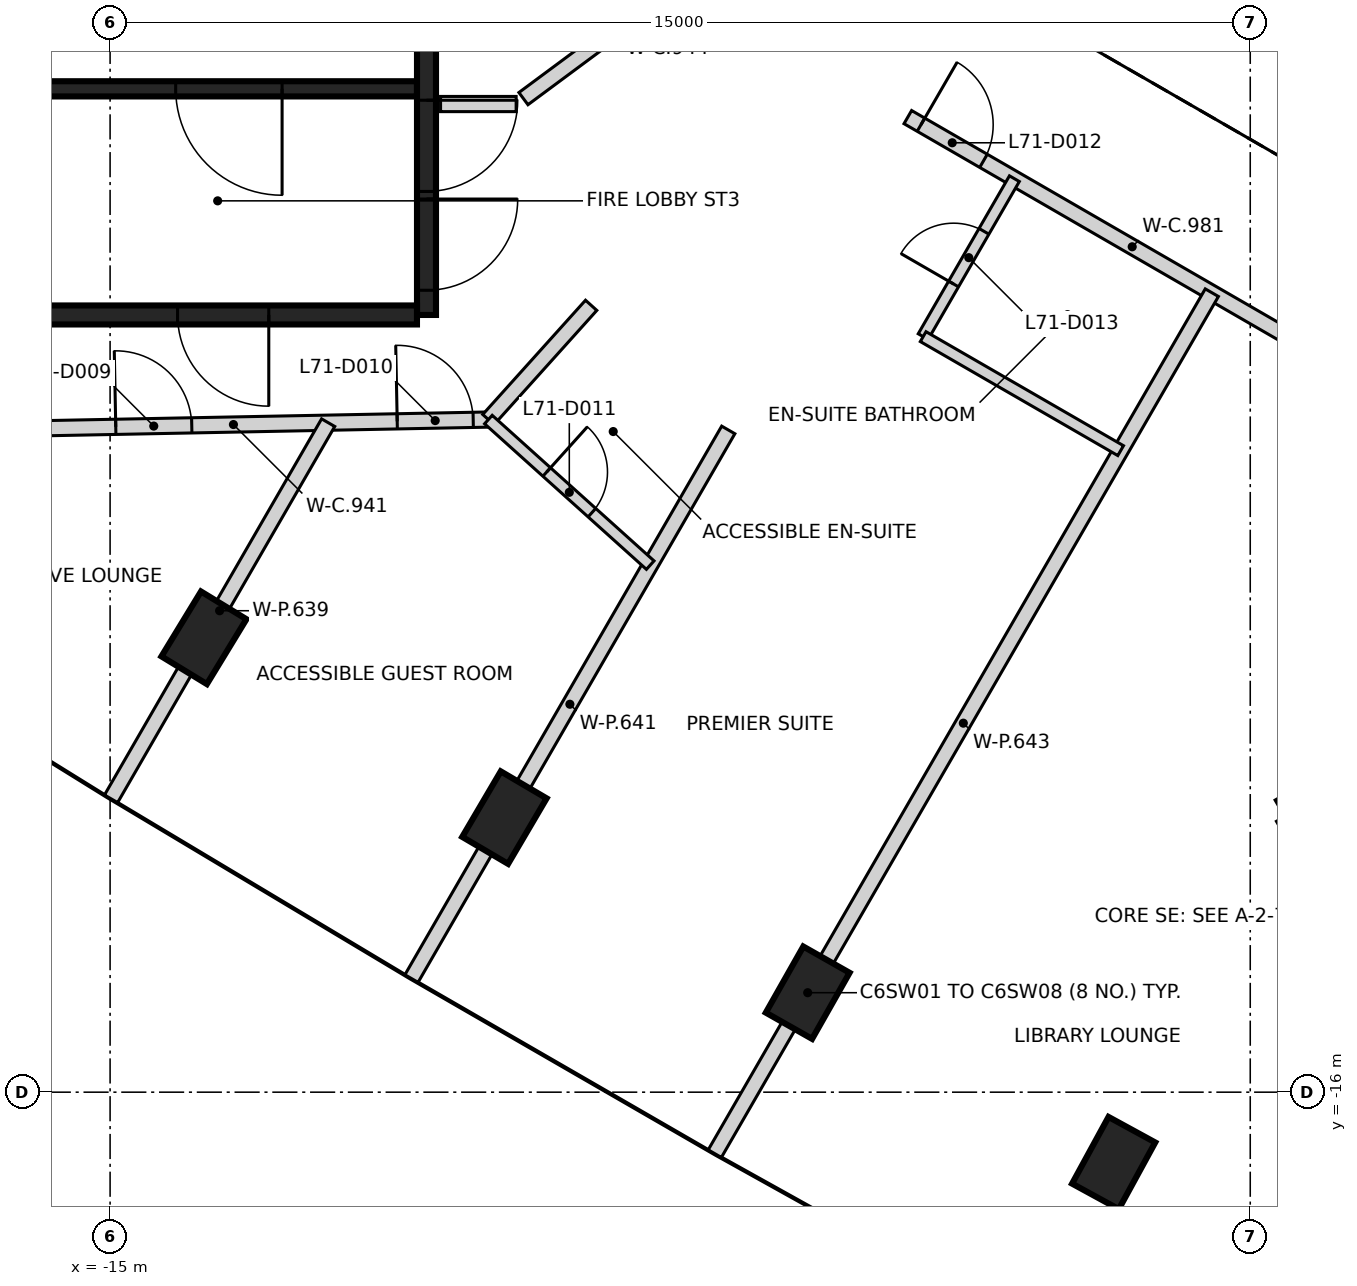
"""IFC4 building model, lengths in metres.
Left out: names, types, materials, properties, quantities, classifications, styles, units other than length and angle.
Written with IfcOpenShell. Run it as: python <this file> out.ifc"""

import sys

from ifc_helpers import new_model, si_unit, direction, frame, frame_2d, origin, origin_2d, place, context, subcontext, project, spatial, rectangle, extrude, element, fill, save


model = new_model("IFC4")
c1 = context("Model", 3, precision=1e-05, world=origin(), true_north=direction((0.0, 1.0)))
c2 = subcontext(c1, "Body", "Model", "MODEL_VIEW")
j1 = project(units=[si_unit("LENGTHUNIT", "METRE"), si_unit("PLANEANGLEUNIT", "RADIAN")], contexts=[c1])
p1 = place(None, origin())
s1 = spatial("IfcSite", under=j1, at=p1, CompositionType="ELEMENT")
p2 = place(p1, origin())
s2 = spatial("IfcBuilding", under=s1, at=p2, CompositionType="ELEMENT")
p3 = place(p2, frame((0.0, 0.0, 280.2)))
s3 = spatial("IfcBuildingStorey", under=s2, at=p3, CompositionType="ELEMENT", Elevation=280.2)
for number, where, z_axis, x_axis in (
    (1, (-13.765, -10.022, -0.35), (0.0, 0.0, 1.0), (0.52, 0.854, 0.0)),
    (2, (-9.812, -12.388, -0.35), (0.0, 0.0, 1.0), (0.507, 0.862, 0.0)),
    (3, (-5.822, -14.691, -0.35), (0.0, 0.0, 1.0), (0.493, 0.87, 0.0)),
    (4, (-1.797, -16.932, -0.35), (0.0, 0.0, 1.0), (0.479, 0.878, 0.0)),
):
    element("IfcColumn", number, at=place(p3, frame(where, z_axis=z_axis, x_axis=x_axis)), inside=s3, PredefinedType="COLUMN", context=c2, shape_type="SweptSolid", body=[
        extrude(rectangle(XDim=1.0, YDim=0.7, at=origin_2d()), origin(), (0.0, 0.0, 1.0), 3.6),
    ])
p4 = place(p3, frame((-10.837, 5.775, 0.0), z_axis=(0.0, 0.0, 1.0), x_axis=(0.0, -1.0, 0.0)))
e5 = element("IfcWall", 5, at=p4, inside=s3, PredefinedType="SHEAR", context=c2, shape_type="SweptSolid", body=[
    extrude(rectangle(XDim=11.55, YDim=0.25, at=frame_2d((5.775, 0.0))), origin(), (0.0, 0.0, 1.0), 3.25),
])
p5 = place(p4, frame((10.025, 0.0, 0.0)))
e6 = element("IfcOpeningElement", 6, at=p5, cuts=e5, PredefinedType="OPENING", context=c2, shape_type="SweptSolid", body=[
    extrude(rectangle(XDim=1.2, YDim=2.1, at=frame_2d((0.6, 1.05))), frame((0.0, 0.135, 0.0), z_axis=(0.0, -1.0, 0.0), x_axis=(1.0, 0.0, 0.0)), (0.0, 0.0, 1.0), 0.27),
])
p6 = place(p4, frame((8.725, 0.0, 0.0)))
e7 = element("IfcOpeningElement", 7, at=p6, cuts=e5, PredefinedType="OPENING", context=c2, shape_type="SweptSolid", body=[
    extrude(rectangle(XDim=1.2, YDim=2.1, at=frame_2d((0.6, 1.05))), frame((0.0, 0.135, 0.0), z_axis=(0.0, -1.0, 0.0), x_axis=(1.0, 0.0, 0.0)), (0.0, 0.0, 1.0), 0.27),
])
p7 = place(p3, frame((-10.963, -5.775, 0.0), z_axis=(0.0, 0.0, 1.0), x_axis=(-1.0, 0.0, 0.0)))
e8 = element("IfcWall", 8, at=p7, inside=s3, PredefinedType="SHEAR", context=c2, shape_type="SweptSolid", body=[
    extrude(rectangle(XDim=5.225, YDim=0.25, at=frame_2d((2.612, 0.0))), origin(), (0.0, 0.0, 1.0), 3.25),
])
p8 = place(p7, frame((1.95, 0.0, 0.0)))
e9 = element("IfcOpeningElement", 9, at=p8, cuts=e8, PredefinedType="OPENING", context=c2, shape_type="SweptSolid", body=[
    extrude(rectangle(XDim=1.2, YDim=2.1, at=frame_2d((0.6, 1.05))), frame((0.0, 0.135, 0.0), z_axis=(0.0, -1.0, 0.0), x_axis=(1.0, 0.0, 0.0)), (0.0, 0.0, 1.0), 0.27),
])
p9 = place(p3, frame((-10.963, -2.8, 0.0), z_axis=(0.0, 0.0, 1.0), x_axis=(-1.0, 0.0, 0.0)))
e10 = element("IfcWall", 10, at=p9, inside=s3, PredefinedType="SHEAR", context=c2, shape_type="SweptSolid", body=[
    extrude(rectangle(XDim=5.098, YDim=0.2, at=frame_2d((2.549, 0.0))), origin(), (0.0, 0.0, 1.0), 3.25),
])
p10 = place(p9, frame((1.774, 0.0, 0.0)))
e11 = element("IfcOpeningElement", 11, at=p10, cuts=e10, PredefinedType="OPENING", context=c2, shape_type="SweptSolid", body=[
    extrude(rectangle(XDim=1.4, YDim=2.1, at=frame_2d((0.7, 1.05))), frame((0.0, 0.11, 0.0), z_axis=(0.0, -1.0, 0.0), x_axis=(1.0, 0.0, 0.0)), (0.0, 0.0, 1.0), 0.22),
])
p11 = place(p3, frame((0.417, -12.273, 0.0), z_axis=(0.0, 0.0, 1.0), x_axis=(0.866021906294, 0.500006057782, 0.0)))
e12 = element("IfcWall", 12, at=p11, inside=s3, PredefinedType="SHEAR", context=c2, shape_type="SweptSolid", body=[
    extrude(rectangle(XDim=11.55, YDim=0.25, at=frame_2d((5.775, 0.0))), origin(), (0.0, 0.0, 1.0), 3.25),
])
p12 = place(p11, frame((10.025, 0.0, 0.0)))
e13 = element("IfcOpeningElement", 13, at=p12, cuts=e12, PredefinedType="OPENING", context=c2, shape_type="SweptSolid", body=[
    extrude(rectangle(XDim=1.2, YDim=2.1, at=frame_2d((0.6, 1.05))), frame((0.0, 0.135, 0.0), z_axis=(0.0, -1.0, 0.0), x_axis=(1.0, 0.0, 0.0)), (0.0, 0.0, 1.0), 0.27),
])
p13 = place(p11, frame((8.725, 0.0, 0.0)))
e14 = element("IfcOpeningElement", 14, at=p13, cuts=e12, PredefinedType="OPENING", context=c2, shape_type="SweptSolid", body=[
    extrude(rectangle(XDim=1.2, YDim=2.1, at=frame_2d((0.6, 1.05))), frame((0.0, 0.135, 0.0), z_axis=(0.0, -1.0, 0.0), x_axis=(1.0, 0.0, 0.0)), (0.0, 0.0, 1.0), 0.27),
])
p14 = place(p3, frame((-16.732, -7.282, 0.0), z_axis=(0.0, 0.0, 1.0), x_axis=(0.999809829903, 0.019501385329, 0.0)))
e15 = element("IfcWall", 15, at=p14, inside=s3, PredefinedType="PARTITIONING", context=c2, shape_type="SweptSolid", body=[
    extrude(rectangle(XDim=6.71, YDim=0.2, at=frame_2d((3.355, 0.0))), origin(), (0.0, 0.0, 1.0), 3.25),
])
p15 = place(p14, frame((1.807, 0.0, 0.0)))
e16 = element("IfcOpeningElement", 16, at=p15, cuts=e15, PredefinedType="OPENING", context=c2, shape_type="SweptSolid", body=[
    extrude(rectangle(XDim=1.0, YDim=2.1, at=frame_2d((0.5, 1.05))), frame((0.0, 0.11, 0.0), z_axis=(0.0, -1.0, 0.0), x_axis=(1.0, 0.0, 0.0)), (0.0, 0.0, 1.0), 0.22),
])
p16 = place(p14, frame((5.51, 0.0, 0.0)))
e17 = element("IfcOpeningElement", 17, at=p16, cuts=e15, PredefinedType="OPENING", context=c2, shape_type="SweptSolid", body=[
    extrude(rectangle(XDim=1.0, YDim=2.1, at=frame_2d((0.5, 1.05))), frame((0.0, 0.11, 0.0), z_axis=(0.0, -1.0, 0.0), x_axis=(1.0, 0.0, 0.0)), (0.0, 0.0, 1.0), 0.22),
])
p17 = place(p3, frame((-10.652, -3.0, 0.0), z_axis=(0.0, 0.0, 1.0), x_axis=(1.0, 0.0, 0.0)))
e18 = element("IfcWall", 18, at=p17, inside=s3, PredefinedType="PARTITIONING", context=c2, shape_type="SweptSolid", body=[
    extrude(rectangle(XDim=0.994, YDim=0.2, at=frame_2d((0.497, 0.0))), origin(), (0.0, 0.0, 1.0), 3.25),
])
p18 = place(p3, frame((-10.023, -7.151, 0.0), z_axis=(0.0, 0.0, 1.0), x_axis=(0.668804583793, 0.743438248073, 0.0)))
e19 = element("IfcWall", 19, at=p18, inside=s3, PredefinedType="PARTITIONING", context=c2, shape_type="SweptSolid", body=[
    extrude(rectangle(XDim=2.021, YDim=0.2, at=frame_2d((1.011, 0.0))), origin(), (0.0, 0.0, 1.0), 3.25),
])
p19 = place(p3, frame((-7.115, -1.115, 0.0), z_axis=(0.0, 0.0, 1.0), x_axis=(-0.803344165632, -0.595515030495, 0.0)))
e20 = element("IfcWall", 20, at=p19, inside=s3, PredefinedType="PARTITIONING", context=c2, shape_type="SweptSolid", body=[
    extrude(rectangle(XDim=3.046, YDim=0.2, at=frame_2d((1.523, 0.0))), origin(), (0.0, 0.0, 1.0), 3.25),
])
p20 = place(p3, frame((-4.505, -3.172, 0.0), z_axis=(0.0, 0.0, 1.0), x_axis=(0.865815783666, -0.500362897061, 0.0)))
e21 = element("IfcWall", 21, at=p20, inside=s3, PredefinedType="PARTITIONING", context=c2, shape_type="SweptSolid", body=[
    extrude(rectangle(XDim=6.819, YDim=0.2, at=frame_2d((3.409, 0.0))), origin(), (0.0, 0.0, 1.0), 3.25),
])
p21 = place(p20, frame((0.2, 0.0, 0.0)))
e22 = element("IfcOpeningElement", 22, at=p21, cuts=e21, PredefinedType="OPENING", context=c2, shape_type="SweptSolid", body=[
    extrude(rectangle(XDim=0.95, YDim=2.1, at=frame_2d((0.475, 1.05))), frame((0.0, 0.11, 0.0), z_axis=(0.0, -1.0, 0.0), x_axis=(1.0, 0.0, 0.0)), (0.0, 0.0, 1.0), 0.22),
])
p22 = place(p3, frame((-14.987, -12.14, 0.0), z_axis=(0.0, 0.0, 1.0), x_axis=(0.499912336857, 0.866076010208, 0.0)))
e23 = element("IfcWall", 23, at=p22, inside=s3, PredefinedType="PARTITIONING", context=c2, shape_type="SweptSolid", body=[
    extrude(rectangle(XDim=5.713, YDim=0.2, at=frame_2d((2.857, 0.0))), origin(), (0.0, 0.0, 1.0), 3.25),
])
p23 = place(p3, frame((-11.035, -14.505, 0.0), z_axis=(0.0, 0.0, 1.0), x_axis=(0.50003941366, 0.866002647102, 0.0)))
e24 = element("IfcWall", 24, at=p23, inside=s3, PredefinedType="PARTITIONING", context=c2, shape_type="SweptSolid", body=[
    extrude(rectangle(XDim=8.334, YDim=0.2, at=frame_2d((4.167, 0.0))), origin(), (0.0, 0.0, 1.0), 3.25),
])
p24 = place(p3, frame((-7.044, -16.809, 0.0), z_axis=(0.0, 0.0, 1.0), x_axis=(0.499969679245, 0.866042908773, 0.0)))
e25 = element("IfcWall", 25, at=p24, inside=s3, PredefinedType="PARTITIONING", context=c2, shape_type="SweptSolid", body=[
    extrude(rectangle(XDim=13.079, YDim=0.2, at=frame_2d((6.54, 0.0))), origin(), (0.0, 0.0, 1.0), 3.25),
])
p25 = place(p3, frame((-10.023, -7.151, 0.0), z_axis=(0.0, 0.0, 1.0), x_axis=(0.743463699468, -0.668776291127, 0.0)))
e26 = element("IfcWall", 26, at=p25, inside=s3, PredefinedType="PARTITIONING", context=c2, shape_type="SweptSolid", body=[
    extrude(rectangle(XDim=2.864, YDim=0.15, at=frame_2d((1.432, 0.0))), origin(), (0.0, 0.0, 1.0), 3.25),
])
p26 = place(p25, frame((1.031, 0.0, 0.0)))
e27 = element("IfcOpeningElement", 27, at=p26, cuts=e26, PredefinedType="OPENING", context=c2, shape_type="SweptSolid", body=[
    extrude(rectangle(XDim=0.8, YDim=2.1, at=frame_2d((0.4, 1.05))), frame((0.0, 0.085, 0.0), z_axis=(0.0, -1.0, 0.0), x_axis=(1.0, 0.0, 0.0)), (0.0, 0.0, 1.0), 0.17),
])
p27 = place(p3, frame((-4.303, -6.06, 0.0), z_axis=(0.0, 0.0, 1.0), x_axis=(0.500045362686, 0.865999212041, 0.0)))
e28 = element("IfcWall", 28, at=p27, inside=s3, PredefinedType="PARTITIONING", context=c2, shape_type="SweptSolid", body=[
    extrude(rectangle(XDim=2.4, YDim=0.15, at=frame_2d((1.2, 0.0))), origin(), (0.0, 0.0, 1.0), 3.25),
])
p28 = place(p27, frame((0.8, 0.0, 0.0)))
e29 = element("IfcOpeningElement", 29, at=p28, cuts=e28, PredefinedType="OPENING", context=c2, shape_type="SweptSolid", body=[
    extrude(rectangle(XDim=0.8, YDim=2.1, at=frame_2d((0.4, 1.05))), frame((0.0, 0.085, 0.0), z_axis=(0.0, -1.0, 0.0), x_axis=(1.0, 0.0, 0.0)), (0.0, 0.0, 1.0), 0.17),
])
p29 = place(p3, frame((-4.303, -6.06, 0.0), z_axis=(0.0, 0.0, 1.0), x_axis=(0.866010750942, -0.50002537861, 0.0)))
e30 = element("IfcWall", 30, at=p29, inside=s3, PredefinedType="PARTITIONING", context=c2, shape_type="SweptSolid", body=[
    extrude(rectangle(XDim=3.0, YDim=0.15, at=frame_2d((1.5, 0.0))), origin(), (0.0, 0.0, 1.0), 3.25),
])
p30 = place(p5, origin())
e31 = element("IfcDoor", 31, at=p30, inside=s3, OperationType="SINGLE_SWING_LEFT", PredefinedType="DOOR", context=c2, shape_type="SweptSolid", body=[
    extrude(rectangle(XDim=1.2, YDim=2.1, at=frame_2d((0.6, 1.05))), frame((0.0, 0.025, 0.0), z_axis=(0.0, -1.0, 0.0), x_axis=(1.0, 0.0, 0.0)), (0.0, 0.0, 1.0), 0.05),
])
fill(e6, e31)
p31 = place(p6, origin())
e32 = element("IfcDoor", 32, at=p31, inside=s3, OperationType="SINGLE_SWING_RIGHT", PredefinedType="DOOR", context=c2, shape_type="SweptSolid", body=[
    extrude(rectangle(XDim=1.2, YDim=2.1, at=frame_2d((0.6, 1.05))), frame((0.0, 0.025, 0.0), z_axis=(0.0, -1.0, 0.0), x_axis=(1.0, 0.0, 0.0)), (0.0, 0.0, 1.0), 0.05),
])
fill(e7, e32)
p32 = place(p10, origin())
e33 = element("IfcDoor", 33, at=p32, inside=s3, OperationType="SINGLE_SWING_LEFT", PredefinedType="DOOR", context=c2, shape_type="SweptSolid", body=[
    extrude(rectangle(XDim=1.4, YDim=2.1, at=frame_2d((0.7, 1.05))), frame((0.0, 0.025, 0.0), z_axis=(0.0, -1.0, 0.0), x_axis=(1.0, 0.0, 0.0)), (0.0, 0.0, 1.0), 0.05),
])
fill(e11, e33)
p33 = place(p8, origin())
e34 = element("IfcDoor", 34, at=p33, inside=s3, OperationType="SINGLE_SWING_RIGHT", PredefinedType="DOOR", context=c2, shape_type="SweptSolid", body=[
    extrude(rectangle(XDim=1.2, YDim=2.1, at=frame_2d((0.6, 1.05))), frame((0.0, 0.025, 0.0), z_axis=(0.0, -1.0, 0.0), x_axis=(1.0, 0.0, 0.0)), (0.0, 0.0, 1.0), 0.05),
])
fill(e9, e34)
p34 = place(p15, origin())
e35 = element("IfcDoor", 35, at=p34, inside=s3, OperationType="SINGLE_SWING_LEFT", PredefinedType="DOOR", context=c2, shape_type="SweptSolid", body=[
    extrude(rectangle(XDim=1.0, YDim=2.1, at=frame_2d((0.5, 1.05))), frame((0.0, 0.025, 0.0), z_axis=(0.0, -1.0, 0.0), x_axis=(1.0, 0.0, 0.0)), (0.0, 0.0, 1.0), 0.05),
])
fill(e16, e35)
p35 = place(p16, frame((1.0, 0.0, 0.0), z_axis=(0.0, 0.0, 1.0), x_axis=(-1.0, 0.0, 0.0)))
e36 = element("IfcDoor", 36, at=p35, inside=s3, OperationType="SINGLE_SWING_LEFT", PredefinedType="DOOR", context=c2, shape_type="SweptSolid", body=[
    extrude(rectangle(XDim=1.0, YDim=2.1, at=frame_2d((0.5, 1.05))), frame((0.0, 0.025, 0.0), z_axis=(0.0, -1.0, 0.0), x_axis=(1.0, 0.0, 0.0)), (0.0, 0.0, 1.0), 0.05),
])
fill(e17, e36)
p36 = place(p26, frame((0.8, 0.0, 0.0), z_axis=(0.0, 0.0, 1.0), x_axis=(-1.0, 0.0, 0.0)))
e37 = element("IfcDoor", 37, at=p36, inside=s3, OperationType="SINGLE_SWING_LEFT", PredefinedType="DOOR", context=c2, shape_type="SweptSolid", body=[
    extrude(rectangle(XDim=0.8, YDim=2.1, at=frame_2d((0.4, 1.05))), frame((0.0, 0.025, 0.0), z_axis=(0.0, -1.0, 0.0), x_axis=(1.0, 0.0, 0.0)), (0.0, 0.0, 1.0), 0.05),
])
fill(e27, e37)
p37 = place(p21, frame((0.95, 0.0, 0.0), z_axis=(0.0, 0.0, 1.0), x_axis=(-1.0, 0.0, 0.0)))
e38 = element("IfcDoor", 38, at=p37, inside=s3, OperationType="SINGLE_SWING_LEFT", PredefinedType="DOOR", context=c2, shape_type="SweptSolid", body=[
    extrude(rectangle(XDim=0.95, YDim=2.1, at=frame_2d((0.475, 1.05))), frame((0.0, 0.025, 0.0), z_axis=(0.0, -1.0, 0.0), x_axis=(1.0, 0.0, 0.0)), (0.0, 0.0, 1.0), 0.05),
])
fill(e22, e38)
p38 = place(p28, frame((0.8, 0.0, 0.0), z_axis=(0.0, 0.0, 1.0), x_axis=(-1.0, 0.0, 0.0)))
e39 = element("IfcDoor", 39, at=p38, inside=s3, OperationType="SINGLE_SWING_LEFT", PredefinedType="DOOR", context=c2, shape_type="SweptSolid", body=[
    extrude(rectangle(XDim=0.8, YDim=2.1, at=frame_2d((0.4, 1.05))), frame((0.0, 0.025, 0.0), z_axis=(0.0, -1.0, 0.0), x_axis=(1.0, 0.0, 0.0)), (0.0, 0.0, 1.0), 0.05),
])
fill(e29, e39)
save(model, sys.argv[1])
